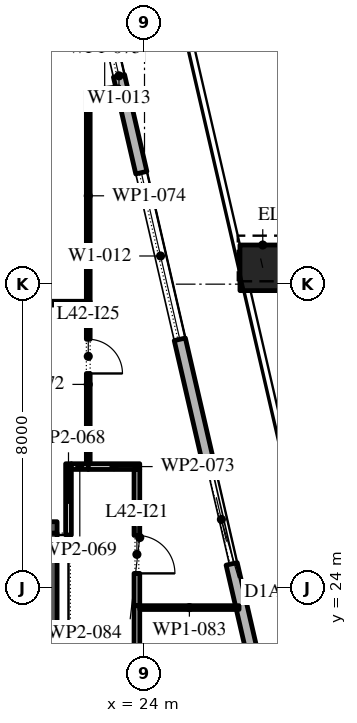
"""IFC4 building model, lengths in metres.
Left out: names, types, materials, properties, quantities, classifications, styles, units other than length and angle.
Written with IfcOpenShell. Run it as: python <this file> out.ifc"""

import sys

from ifc_helpers import new_model, si_unit, direction, frame, frame_2d, origin, origin_2d, place, context, subcontext, project, spatial, rectangle, extrude, element, fill, save


model = new_model("IFC4")
c1 = context("Model", 3, precision=1e-05, world=origin(), true_north=direction((0.0, 1.0)))
c2 = subcontext(c1, "Body", "Model", "MODEL_VIEW")
j1 = project(units=[si_unit("LENGTHUNIT", "METRE"), si_unit("PLANEANGLEUNIT", "RADIAN")], contexts=[c1])
p1 = place(None, origin())
s1 = spatial("IfcSite", under=j1, at=p1, CompositionType="ELEMENT")
p2 = place(p1, origin())
s2 = spatial("IfcBuilding", under=s1, at=p2, CompositionType="ELEMENT")
p3 = place(p2, frame((0.0, 0.0, 192.6)))
s3 = spatial("IfcBuildingStorey", under=s2, at=p3, CompositionType="ELEMENT", Elevation=192.6)
p4 = place(p3, frame((27.112, 32.43, 0.0), z_axis=(-0.013519814281, 0.05837310372, 0.998203283597), x_axis=(-0.974211350104, -0.225637420054, 0.0)))
e1 = element("IfcColumn", 1, at=p4, inside=s3, PredefinedType="COLUMN", context=c2, shape_type="SweptSolid", body=[
    extrude(rectangle(XDim=1.2, YDim=1.2, at=origin_2d()), origin(), (0.0, 0.0, 1.0), 4.208),
])
p5 = place(p3, frame((33.157, -5.092, 0.0), z_axis=(0.0, 0.0, 1.0), x_axis=(-0.224950279389, 0.974370243697, 0.0)))
e2 = element("IfcWall", 2, at=p5, inside=s3, PredefinedType="STANDARD", context=c2, shape_type="SweptSolid", body=[
    extrude(rectangle(XDim=49.5, YDim=0.3, at=frame_2d((24.75, 0.0))), origin(), (0.0, 0.0, 1.0), 4.0),
])
p6 = place(p5, frame((2.207, 0.0, 0.0)))
e3 = element("IfcOpeningElement", 3, at=p6, cuts=e2, PredefinedType="OPENING", context=c2, shape_type="SweptSolid", body=[
    extrude(rectangle(XDim=2.4, YDim=3.125, at=frame_2d((1.2, 1.562))), frame((0.0, 0.16, 0.0), z_axis=(0.0, -1.0, 0.0), x_axis=(1.0, 0.0, 0.0)), (0.0, 0.0, 1.0), 0.32),
])
p7 = place(p5, frame((8.121, 0.0, 0.45)))
e4 = element("IfcOpeningElement", 4, at=p7, cuts=e2, PredefinedType="OPENING", context=c2, shape_type="SweptSolid", body=[
    extrude(rectangle(XDim=4.5, YDim=2.875, at=frame_2d((2.25, 1.438))), frame((0.0, 0.16, 0.0), z_axis=(0.0, -1.0, 0.0), x_axis=(1.0, 0.0, 0.0)), (0.0, 0.0, 1.0), 0.32),
])
p8 = place(p5, frame((15.236, 0.0, 0.45)))
e5 = element("IfcOpeningElement", 5, at=p8, cuts=e2, PredefinedType="OPENING", context=c2, shape_type="SweptSolid", body=[
    extrude(rectangle(XDim=4.5, YDim=2.875, at=frame_2d((2.25, 1.438))), frame((0.0, 0.16, 0.0), z_axis=(0.0, -1.0, 0.0), x_axis=(1.0, 0.0, 0.0)), (0.0, 0.0, 1.0), 0.32),
])
p9 = place(p5, frame((22.35, 0.0, 0.45)))
e6 = element("IfcOpeningElement", 6, at=p9, cuts=e2, PredefinedType="OPENING", context=c2, shape_type="SweptSolid", body=[
    extrude(rectangle(XDim=4.5, YDim=3.0, at=frame_2d((2.25, 1.5))), frame((0.0, 0.16, 0.0), z_axis=(0.0, -1.0, 0.0), x_axis=(1.0, 0.0, 0.0)), (0.0, 0.0, 1.0), 0.32),
])
p10 = place(p5, frame((30.514, 0.0, 0.0)))
e7 = element("IfcOpeningElement", 7, at=p10, cuts=e2, PredefinedType="OPENING", context=c2, shape_type="SweptSolid", body=[
    extrude(rectangle(XDim=2.4, YDim=3.45, at=frame_2d((1.2, 1.725))), frame((0.0, 0.16, 0.0), z_axis=(0.0, -1.0, 0.0), x_axis=(1.0, 0.0, 0.0)), (0.0, 0.0, 1.0), 0.32),
])
p11 = place(p5, frame((36.579, 0.0, 0.45)))
e8 = element("IfcOpeningElement", 8, at=p11, cuts=e2, PredefinedType="OPENING", context=c2, shape_type="SweptSolid", body=[
    extrude(rectangle(XDim=4.5, YDim=3.05, at=frame_2d((2.25, 1.525))), frame((0.0, 0.16, 0.0), z_axis=(0.0, -1.0, 0.0), x_axis=(1.0, 0.0, 0.0)), (0.0, 0.0, 1.0), 0.32),
])
p12 = place(p5, frame((43.693, 0.0, 0.45)))
e9 = element("IfcOpeningElement", 9, at=p12, cuts=e2, PredefinedType="OPENING", context=c2, shape_type="SweptSolid", body=[
    extrude(rectangle(XDim=4.5, YDim=3.05, at=frame_2d((2.25, 1.525))), frame((0.0, 0.16, 0.0), z_axis=(0.0, -1.0, 0.0), x_axis=(1.0, 0.0, 0.0)), (0.0, 0.0, 1.0), 0.32),
])
p13 = place(p3, frame((21.35, -2.45, 0.0), z_axis=(0.0, 0.0, 1.0), x_axis=(0.0, 1.0, 0.0)))
e10 = element("IfcWall", 10, at=p13, inside=s3, PredefinedType="SHEAR", context=c2, shape_type="SweptSolid", body=[
    extrude(rectangle(XDim=27.9, YDim=0.7, at=frame_2d((13.95, 0.0))), origin(), (0.0, 0.0, 1.0), 4.0),
])
p14 = place(p13, frame((5.05, 0.0, 0.0)))
e11 = element("IfcOpeningElement", 11, at=p14, cuts=e10, PredefinedType="OPENING", context=c2, shape_type="SweptSolid", body=[
    extrude(rectangle(XDim=1.2, YDim=2.1, at=frame_2d((0.6, 1.05))), frame((0.0, 0.36, 0.0), z_axis=(0.0, -1.0, 0.0), x_axis=(1.0, 0.0, 0.0)), (0.0, 0.0, 1.0), 0.72),
])
p15 = place(p13, frame((21.65, 0.0, 0.0)))
e12 = element("IfcOpeningElement", 12, at=p15, cuts=e10, PredefinedType="OPENING", context=c2, shape_type="SweptSolid", body=[
    extrude(rectangle(XDim=1.2, YDim=2.1, at=frame_2d((0.6, 1.05))), frame((0.0, 0.36, 0.0), z_axis=(0.0, -1.0, 0.0), x_axis=(1.0, 0.0, 0.0)), (0.0, 0.0, 1.0), 0.72),
])
p16 = place(p3, frame((10.3, 25.6, 0.0), z_axis=(0.0, 0.0, 1.0), x_axis=(1.0, 0.0, 0.0)))
e13 = element("IfcWall", 13, at=p16, inside=s3, PredefinedType="SHEAR", context=c2, shape_type="SweptSolid", body=[
    extrude(rectangle(XDim=11.4, YDim=0.3, at=frame_2d((5.7, 0.0))), origin(), (0.0, 0.0, 1.0), 4.0),
])
p17 = place(p3, frame((14.43, 31.5, 0.0), z_axis=(0.0, 0.0, 1.0), x_axis=(1.0, 0.0, 0.0)))
e14 = element("IfcWall", 14, at=p17, inside=s3, PredefinedType="PARTITIONING", context=c2, shape_type="SweptSolid", body=[
    extrude(rectangle(XDim=8.14, YDim=0.1, at=frame_2d((4.07, 0.0))), origin(), (0.0, 0.0, 1.0), 4.0),
])
p18 = place(p3, frame((22.0, 25.4, 0.0), z_axis=(0.0, 0.0, 1.0), x_axis=(0.0, 1.0, 0.0)))
e15 = element("IfcWall", 15, at=p18, inside=s3, PredefinedType="PARTITIONING", context=c2, shape_type="SweptSolid", body=[
    extrude(rectangle(XDim=1.875, YDim=0.15, at=frame_2d((0.938, 0.0))), origin(), (0.0, 0.0, 1.0), 4.0),
])
p19 = place(p3, frame((22.075, 27.2, 0.0), z_axis=(0.0, 0.0, 1.0), x_axis=(1.0, 0.0, 0.0)))
e16 = element("IfcWall", 16, at=p19, inside=s3, PredefinedType="PARTITIONING", context=c2, shape_type="SweptSolid", body=[
    extrude(rectangle(XDim=0.445, YDim=0.15, at=frame_2d((0.223, 0.0))), origin(), (0.0, 0.0, 1.0), 4.0),
])
p20 = place(p3, frame((22.52, 27.275, 0.0), z_axis=(0.0, 0.0, 1.0), x_axis=(0.0, 1.0, 0.0)))
e17 = element("IfcWall", 17, at=p20, inside=s3, PredefinedType="PARTITIONING", context=c2, shape_type="SweptSolid", body=[
    extrude(rectangle(XDim=4.175, YDim=0.1, at=frame_2d((2.087, 0.0))), origin(), (0.0, 0.0, 1.0), 4.0),
])
p21 = place(p20, frame((2.375, 0.0, 0.0)))
e18 = element("IfcOpeningElement", 18, at=p21, cuts=e17, PredefinedType="OPENING", context=c2, shape_type="SweptSolid", body=[
    extrude(rectangle(XDim=0.9, YDim=2.1, at=frame_2d((0.45, 1.05))), frame((0.0, 0.06, 0.0), z_axis=(0.0, -1.0, 0.0), x_axis=(1.0, 0.0, 0.0)), (0.0, 0.0, 1.0), 0.12),
])
p22 = place(p3, frame((22.52, 27.2, 0.0), z_axis=(0.0, 0.0, 1.0), x_axis=(1.0, 0.0, 0.0)))
e19 = element("IfcWall", 19, at=p22, inside=s3, PredefinedType="PARTITIONING", context=c2, shape_type="SweptSolid", body=[
    extrude(rectangle(XDim=1.355, YDim=0.15, at=frame_2d((0.677, 0.0))), origin(), (0.0, 0.0, 1.0), 4.0),
])
p23 = place(p3, frame((22.52, 31.55, 0.0), z_axis=(0.0, 0.0, 1.0), x_axis=(0.0, 1.0, 0.0)))
e20 = element("IfcWall", 20, at=p23, inside=s3, PredefinedType="PARTITIONING", context=c2, shape_type="SweptSolid", body=[
    extrude(rectangle(XDim=5.55, YDim=0.1, at=frame_2d((2.775, 0.0))), origin(), (0.0, 0.0, 1.0), 4.0),
])
p24 = place(p3, frame((22.57, 37.056, 0.0), z_axis=(0.0, 0.0, 1.0), x_axis=(0.993410326243, 0.114612057454, 0.0)))
e21 = element("IfcWall", 21, at=p24, inside=s3, PredefinedType="PARTITIONING", context=c2, shape_type="SweptSolid", body=[
    extrude(rectangle(XDim=0.769, YDim=0.1, at=frame_2d((0.385, 0.0))), origin(), (0.0, 0.0, 1.0), 4.0),
])
p25 = place(p3, frame((23.8, 23.54, 0.0), z_axis=(0.0, 0.0, 1.0), x_axis=(0.0, -1.0, 0.0)))
e22 = element("IfcWall", 22, at=p25, inside=s3, PredefinedType="PARTITIONING", context=c2, shape_type="SweptSolid", body=[
    extrude(rectangle(XDim=8.16, YDim=0.15, at=frame_2d((4.08, 0.0))), origin(), (0.0, 0.0, 1.0), 4.0),
])
p26 = place(p25, frame((3.51, 0.0, 0.0)))
e23 = element("IfcOpeningElement", 23, at=p26, cuts=e22, PredefinedType="OPENING", context=c2, shape_type="SweptSolid", body=[
    extrude(rectangle(XDim=1.0, YDim=2.1, at=frame_2d((0.5, 1.05))), frame((0.0, 0.085, 0.0), z_axis=(0.0, -1.0, 0.0), x_axis=(1.0, 0.0, 0.0)), (0.0, 0.0, 1.0), 0.17),
])
p27 = place(p3, frame((23.875, 23.49, 0.0), z_axis=(0.0, 0.0, 1.0), x_axis=(1.0, 0.0, 0.0)))
e24 = element("IfcWall", 24, at=p27, inside=s3, PredefinedType="PARTITIONING", context=c2, shape_type="SweptSolid", body=[
    extrude(rectangle(XDim=2.612, YDim=0.1, at=frame_2d((1.306, 0.0))), origin(), (0.0, 0.0, 1.0), 4.0),
])
p28 = place(p3, frame((23.8, 27.125, 0.0), z_axis=(0.0, 0.0, 1.0), x_axis=(0.0, -1.0, 0.0)))
e25 = element("IfcWall", 25, at=p28, inside=s3, PredefinedType="PARTITIONING", context=c2, shape_type="SweptSolid", body=[
    extrude(rectangle(XDim=3.585, YDim=0.15, at=frame_2d((1.792, 0.0))), origin(), (0.0, 0.0, 1.0), 4.0),
])
p29 = place(p28, frame((1.735, 0.0, 0.0)))
e26 = element("IfcOpeningElement", 26, at=p29, cuts=e25, PredefinedType="OPENING", context=c2, shape_type="SweptSolid", body=[
    extrude(rectangle(XDim=1.0, YDim=2.1, at=frame_2d((0.5, 1.05))), frame((0.0, 0.085, 0.0), z_axis=(0.0, -1.0, 0.0), x_axis=(1.0, 0.0, 0.0)), (0.0, 0.0, 1.0), 0.17),
])
p30 = place(p10, origin())
e27 = element("IfcDoor", 27, at=p30, inside=s3, OperationType="DOUBLE_DOOR_SLIDING", PredefinedType="DOOR", context=c2, shape_type="SweptSolid", body=[
    extrude(rectangle(XDim=2.4, YDim=3.45, at=frame_2d((1.2, 1.725))), frame((0.0, 0.025, 0.0), z_axis=(0.0, -1.0, 0.0), x_axis=(1.0, 0.0, 0.0)), (0.0, 0.0, 1.0), 0.05),
])
fill(e7, e27)
p31 = place(p11, origin())
e28 = element("IfcWindow", 28, at=p31, inside=s3, PartitioningType="DOUBLE_PANEL_VERTICAL", PredefinedType="WINDOW", context=c2, shape_type="SweptSolid", body=[
    extrude(rectangle(XDim=4.5, YDim=3.05, at=frame_2d((2.25, 1.525))), frame((0.0, 0.03, 0.0), z_axis=(0.0, -1.0, 0.0), x_axis=(1.0, 0.0, 0.0)), (0.0, 0.0, 1.0), 0.06),
])
fill(e8, e28)
p32 = place(p12, origin())
e29 = element("IfcWindow", 29, at=p32, inside=s3, PartitioningType="DOUBLE_PANEL_VERTICAL", PredefinedType="WINDOW", context=c2, shape_type="SweptSolid", body=[
    extrude(rectangle(XDim=4.5, YDim=3.05, at=frame_2d((2.25, 1.525))), frame((0.0, 0.03, 0.0), z_axis=(0.0, -1.0, 0.0), x_axis=(1.0, 0.0, 0.0)), (0.0, 0.0, 1.0), 0.06),
])
fill(e9, e29)
p33 = place(p29, origin())
e30 = element("IfcDoor", 30, at=p33, inside=s3, OperationType="SINGLE_SWING_LEFT", PredefinedType="DOOR", context=c2, shape_type="SweptSolid", body=[
    extrude(rectangle(XDim=1.0, YDim=2.1, at=frame_2d((0.5, 1.05))), frame((0.0, 0.025, 0.0), z_axis=(0.0, -1.0, 0.0), x_axis=(1.0, 0.0, 0.0)), (0.0, 0.0, 1.0), 0.05),
])
fill(e26, e30)
p34 = place(p21, frame((0.9, 0.0, 0.0), z_axis=(0.0, 0.0, 1.0), x_axis=(-1.0, 0.0, 0.0)))
e31 = element("IfcDoor", 31, at=p34, inside=s3, OperationType="SINGLE_SWING_LEFT", PredefinedType="DOOR", context=c2, shape_type="SweptSolid", body=[
    extrude(rectangle(XDim=0.9, YDim=2.1, at=frame_2d((0.45, 1.05))), frame((0.0, 0.025, 0.0), z_axis=(0.0, -1.0, 0.0), x_axis=(1.0, 0.0, 0.0)), (0.0, 0.0, 1.0), 0.05),
])
fill(e18, e31)
save(model, sys.argv[1])
